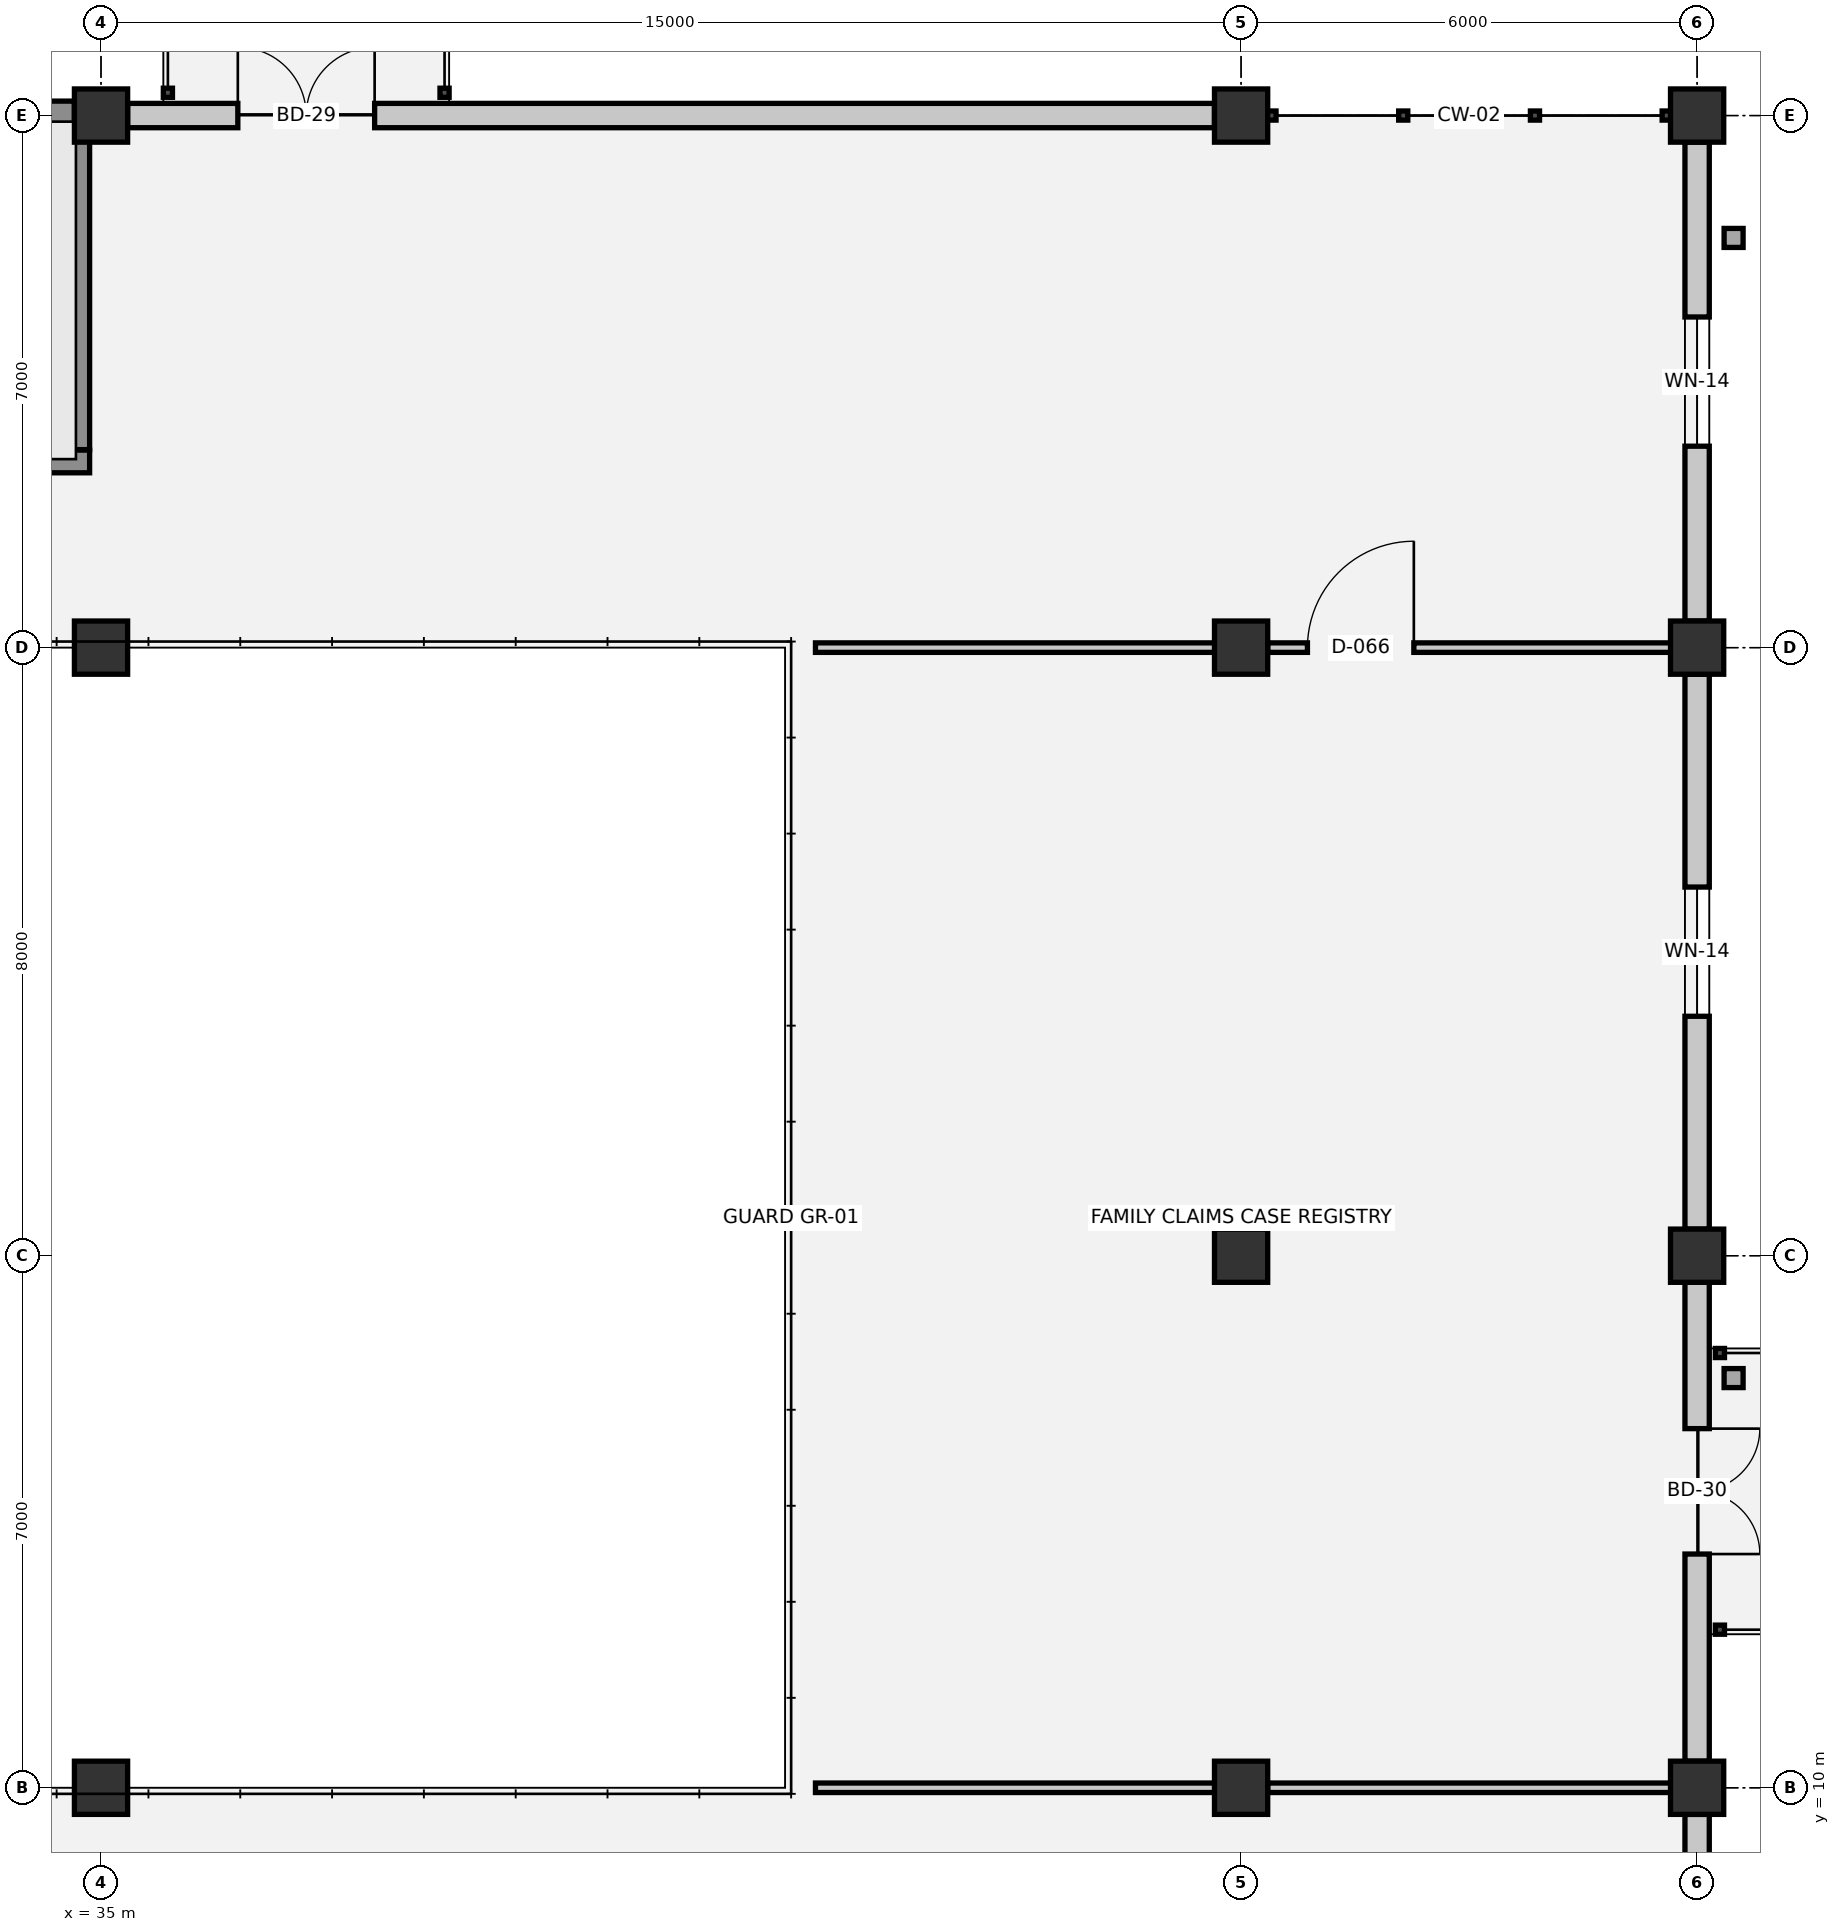
"""IFC4 building model, lengths in metres.
Left out: names, types, materials, properties, quantities, classifications, styles, units other than length and angle.
Written with IfcOpenShell. Run it as: python <this file> out.ifc"""

import sys

from ifc_helpers import new_model, si_unit, direction, frame, frame_2d, origin, origin_2d, place, context, subcontext, project, spatial, rectangle, extrude, element, fill, save


model = new_model("IFC4")
c1 = context("Model", 3, precision=1e-05, world=origin(), true_north=direction((0.0, 1.0)))
c2 = subcontext(c1, "Body", "Model", "MODEL_VIEW")
j1 = project(units=[si_unit("LENGTHUNIT", "METRE"), si_unit("PLANEANGLEUNIT", "RADIAN")], contexts=[c1])
p1 = place(None, origin())
s1 = spatial("IfcSite", under=j1, at=p1, CompositionType="ELEMENT")
p2 = place(p1, origin())
s2 = spatial("IfcBuilding", under=s1, at=p2, CompositionType="ELEMENT")
p3 = place(p2, frame((0.0, 0.0, 5.4)))
s3 = spatial("IfcBuildingStorey", under=s2, at=p3, CompositionType="ELEMENT", Elevation=5.4)
for number, where, z_axis, x_axis in (
    (1, (35.0, 10.0, 0.0), (0.0, 0.0, 1.0), (1.0, 0.0, 0.0)),
    (2, (35.0, 25.0, 0.0), (0.0, 0.0, 1.0), (1.0, 0.0, 0.0)),
    (3, (35.0, 32.0, 0.0), (0.0, 0.0, 1.0), (1.0, 0.0, 0.0)),
    (4, (50.0, 10.0, 0.0), (0.0, 0.0, 1.0), (1.0, 0.0, 0.0)),
    (5, (50.0, 17.0, 0.0), (0.0, 0.0, 1.0), (1.0, 0.0, 0.0)),
    (6, (50.0, 25.0, 0.0), (0.0, 0.0, 1.0), (1.0, 0.0, 0.0)),
    (7, (50.0, 32.0, 0.0), (0.0, 0.0, 1.0), (1.0, 0.0, 0.0)),
    (8, (56.0, 10.0, 0.0), (0.0, 0.0, 1.0), (1.0, 0.0, 0.0)),
    (9, (56.0, 17.0, 0.0), (0.0, 0.0, 1.0), (1.0, 0.0, 0.0)),
    (10, (56.0, 25.0, 0.0), (0.0, 0.0, 1.0), (1.0, 0.0, 0.0)),
    (11, (56.0, 32.0, 0.0), (0.0, 0.0, 1.0), (1.0, 0.0, 0.0)),
):
    element("IfcColumn", number, at=place(p3, frame(where, z_axis=z_axis, x_axis=x_axis)), inside=s3, PredefinedType="COLUMN", context=c2, shape_type="SweptSolid", body=[
        extrude(rectangle(XDim=0.7, YDim=0.7, at=origin_2d()), origin(), (0.0, 0.0, 1.0), 4.5),
    ])
p4 = place(p3, frame((20.35, 32.0, 0.0), z_axis=(0.0, 0.0, 1.0), x_axis=(1.0, 0.0, 0.0)))
e12 = element("IfcWall", 12, at=p4, inside=s3, PredefinedType="STANDARD", context=c2, shape_type="SweptSolid", body=[
    extrude(rectangle(XDim=14.3, YDim=0.38, at=frame_2d((7.15, 0.0))), origin(), (0.0, 0.0, 1.0), 3.26),
])
p5 = place(p4, frame((3.88, 0.0, 0.95)))
e13 = element("IfcOpeningElement", 13, at=p5, cuts=e12, PredefinedType="OPENING", context=c2, shape_type="SweptSolid", body=[
    extrude(rectangle(XDim=2.55, YDim=1.25, at=frame_2d((1.275, 0.625))), frame((0.0, 0.2, 0.0), z_axis=(0.0, -1.0, 0.0), x_axis=(1.0, 0.0, 0.0)), (0.0, 0.0, 1.0), 0.4),
])
p6 = place(p3, frame((35.35, 32.0, 0.0), z_axis=(0.0, 0.0, 1.0), x_axis=(1.0, 0.0, 0.0)))
e14 = element("IfcWall", 14, at=p6, inside=s3, PredefinedType="SOLIDWALL", context=c2, shape_type="SweptSolid", body=[
    extrude(rectangle(XDim=14.3, YDim=0.32, at=frame_2d((7.15, 0.0))), origin(), (0.0, 0.0, 1.0), 3.26),
])
p7 = place(p6, frame((1.45, 0.0, 0.0)))
e15 = element("IfcOpeningElement", 15, at=p7, cuts=e14, PredefinedType="OPENING", context=c2, shape_type="SweptSolid", body=[
    extrude(rectangle(XDim=1.8, YDim=2.25, at=frame_2d((0.9, 1.125))), frame((0.0, 0.17, 0.0), z_axis=(0.0, -1.0, 0.0), x_axis=(1.0, 0.0, 0.0)), (0.0, 0.0, 1.0), 0.34),
])
p8 = place(p3, frame((56.0, 31.65, 0.0), z_axis=(0.0, 0.0, 1.0), x_axis=(0.0, -1.0, 0.0)))
e16 = element("IfcWall", 16, at=p8, inside=s3, PredefinedType="SOLIDWALL", context=c2, shape_type="SweptSolid", body=[
    extrude(rectangle(XDim=6.3, YDim=0.32, at=frame_2d((3.15, 0.0))), origin(), (0.0, 0.0, 1.0), 3.26),
])
p9 = place(p8, frame((2.3, 0.0, 0.9)))
e17 = element("IfcOpeningElement", 17, at=p9, cuts=e16, PredefinedType="OPENING", context=c2, shape_type="SweptSolid", body=[
    extrude(rectangle(XDim=1.7, YDim=1.9, at=frame_2d((0.85, 0.95))), frame((0.0, 0.17, 0.0), z_axis=(0.0, -1.0, 0.0), x_axis=(1.0, 0.0, 0.0)), (0.0, 0.0, 1.0), 0.34),
])
p10 = place(p3, frame((56.0, 24.65, 0.0), z_axis=(0.0, 0.0, 1.0), x_axis=(0.0, -1.0, 0.0)))
e18 = element("IfcWall", 18, at=p10, inside=s3, PredefinedType="SOLIDWALL", context=c2, shape_type="SweptSolid", body=[
    extrude(rectangle(XDim=7.3, YDim=0.32, at=frame_2d((3.65, 0.0))), origin(), (0.0, 0.0, 1.0), 3.26),
])
p11 = place(p10, frame((2.8, 0.0, 0.9)))
e19 = element("IfcOpeningElement", 19, at=p11, cuts=e18, PredefinedType="OPENING", context=c2, shape_type="SweptSolid", body=[
    extrude(rectangle(XDim=1.7, YDim=1.9, at=frame_2d((0.85, 0.95))), frame((0.0, 0.17, 0.0), z_axis=(0.0, -1.0, 0.0), x_axis=(1.0, 0.0, 0.0)), (0.0, 0.0, 1.0), 0.34),
])
p12 = place(p3, frame((56.0, 16.65, 0.0), z_axis=(0.0, 0.0, 1.0), x_axis=(0.0, -1.0, 0.0)))
e20 = element("IfcWall", 20, at=p12, inside=s3, PredefinedType="SOLIDWALL", context=c2, shape_type="SweptSolid", body=[
    extrude(rectangle(XDim=6.3, YDim=0.32, at=frame_2d((3.15, 0.0))), origin(), (0.0, 0.0, 1.0), 3.26),
])
p13 = place(p12, frame((1.925, 0.0, 0.0)))
e21 = element("IfcOpeningElement", 21, at=p13, cuts=e20, PredefinedType="OPENING", context=c2, shape_type="SweptSolid", body=[
    extrude(rectangle(XDim=1.65, YDim=2.2, at=frame_2d((0.825, 1.1))), frame((0.0, 0.17, 0.0), z_axis=(0.0, -1.0, 0.0), x_axis=(1.0, 0.0, 0.0)), (0.0, 0.0, 1.0), 0.34),
])
p14 = place(p3, frame((56.0, 9.65, 0.0), z_axis=(0.0, 0.0, 1.0), x_axis=(0.0, -1.0, 0.0)))
e22 = element("IfcWall", 22, at=p14, inside=s3, PredefinedType="SOLIDWALL", context=c2, shape_type="SweptSolid", body=[
    extrude(rectangle(XDim=5.3, YDim=0.32, at=frame_2d((2.65, 0.0))), origin(), (0.0, 0.0, 1.0), 3.26),
])
p15 = place(p14, frame((2.07, 0.0, 0.9)))
e23 = element("IfcOpeningElement", 23, at=p15, cuts=e22, PredefinedType="OPENING", context=c2, shape_type="SweptSolid", body=[
    extrude(rectangle(XDim=1.7, YDim=1.9, at=frame_2d((0.85, 0.95))), frame((0.0, 0.17, 0.0), z_axis=(0.0, -1.0, 0.0), x_axis=(1.0, 0.0, 0.0)), (0.0, 0.0, 1.0), 0.34),
])
p16 = place(p3, frame((27.15, 27.45, 0.0), z_axis=(0.0, 0.0, 1.0), x_axis=(1.0, 0.0, 0.0)))
e24 = element("IfcWall", 24, at=p16, inside=s3, PredefinedType="SHEAR", context=c2, shape_type="SweptSolid", body=[
    extrude(rectangle(XDim=7.7, YDim=0.3, at=frame_2d((3.85, 0.0))), origin(), (0.0, 0.0, 1.0), 4.24),
])
p17 = place(p16, frame((0.425, 0.0, 0.0)))
e25 = element("IfcOpeningElement", 25, at=p17, cuts=e24, PredefinedType="OPENING", context=c2, shape_type="SweptSolid", body=[
    extrude(rectangle(XDim=1.25, YDim=2.15, at=frame_2d((0.625, 1.075))), frame((0.0, 0.16, 0.0), z_axis=(0.0, -1.0, 0.0), x_axis=(1.0, 0.0, 0.0)), (0.0, 0.0, 1.0), 0.32),
])
p18 = place(p3, frame((34.7, 27.605, 0.0), z_axis=(0.0, 0.0, 1.0), x_axis=(0.0, 1.0, 0.0)))
e26 = element("IfcWall", 26, at=p18, inside=s3, PredefinedType="SHEAR", context=c2, shape_type="SweptSolid", body=[
    extrude(rectangle(XDim=4.2, YDim=0.3, at=frame_2d((2.1, 0.0))), origin(), (0.0, 0.0, 1.0), 4.24),
])
p19 = place(p3, frame((44.4, 10.0, 0.0), z_axis=(0.0, 0.0, 1.0), x_axis=(1.0, 0.0, 0.0)))
e27 = element("IfcWall", 27, at=p19, inside=s3, PredefinedType="PARTITIONING", context=c2, shape_type="SweptSolid", body=[
    extrude(rectangle(XDim=5.95, YDim=0.125, at=frame_2d((2.975, 0.0))), origin(), (0.0, 0.0, 1.0), 3.28),
])
p20 = place(p3, frame((50.35, 10.0, 0.0), z_axis=(0.0, 0.0, 1.0), x_axis=(1.0, 0.0, 0.0)))
e28 = element("IfcWall", 28, at=p20, inside=s3, PredefinedType="PARTITIONING", context=c2, shape_type="SweptSolid", body=[
    extrude(rectangle(XDim=5.57, YDim=0.125, at=frame_2d((2.785, 0.0))), origin(), (0.0, 0.0, 1.0), 3.53),
])
p21 = place(p3, frame((44.4, 25.0, 0.0), z_axis=(0.0, 0.0, 1.0), x_axis=(1.0, 0.0, 0.0)))
e29 = element("IfcWall", 29, at=p21, inside=s3, PredefinedType="PARTITIONING", context=c2, shape_type="SweptSolid", body=[
    extrude(rectangle(XDim=5.95, YDim=0.125, at=frame_2d((2.975, 0.0))), origin(), (0.0, 0.0, 1.0), 3.28),
])
p22 = place(p3, frame((50.35, 25.0, 0.0), z_axis=(0.0, 0.0, 1.0), x_axis=(1.0, 0.0, 0.0)))
e30 = element("IfcWall", 30, at=p22, inside=s3, PredefinedType="PARTITIONING", context=c2, shape_type="SweptSolid", body=[
    extrude(rectangle(XDim=5.57, YDim=0.125, at=frame_2d((2.785, 0.0))), origin(), (0.0, 0.0, 1.0), 3.53),
])
p23 = place(p22, frame((0.523, 0.0, 0.0)))
e31 = element("IfcOpeningElement", 31, at=p23, cuts=e30, PredefinedType="OPENING", context=c2, shape_type="SweptSolid", body=[
    extrude(rectangle(XDim=1.4, YDim=2.2, at=frame_2d((0.7, 1.1))), frame((0.0, 0.073, 0.0), z_axis=(0.0, -1.0, 0.0), x_axis=(1.0, 0.0, 0.0)), (0.0, 0.0, 1.0), 0.145),
])
p24 = place(p7, origin())
e32 = element("IfcDoor", 32, at=p24, inside=s3, OperationType="DOUBLE_DOOR_SINGLE_SWING", PredefinedType="DOOR", context=c2, shape_type="SweptSolid", body=[
    extrude(rectangle(XDim=1.8, YDim=2.25, at=frame_2d((0.9, 1.125))), frame((0.0, 0.025, 0.0), z_axis=(0.0, -1.0, 0.0), x_axis=(1.0, 0.0, 0.0)), (0.0, 0.0, 1.0), 0.05),
])
fill(e15, e32)
p25 = place(p9, origin())
e33 = element("IfcWindow", 33, at=p25, inside=s3, PartitioningType="SINGLE_PANEL", PredefinedType="WINDOW", context=c2, shape_type="SweptSolid", body=[
    extrude(rectangle(XDim=1.7, YDim=1.9, at=frame_2d((0.85, 0.95))), frame((0.0, 0.03, 0.0), z_axis=(0.0, -1.0, 0.0), x_axis=(1.0, 0.0, 0.0)), (0.0, 0.0, 1.0), 0.06),
])
fill(e17, e33)
p26 = place(p11, origin())
e34 = element("IfcWindow", 34, at=p26, inside=s3, PartitioningType="SINGLE_PANEL", PredefinedType="WINDOW", context=c2, shape_type="SweptSolid", body=[
    extrude(rectangle(XDim=1.7, YDim=1.9, at=frame_2d((0.85, 0.95))), frame((0.0, 0.03, 0.0), z_axis=(0.0, -1.0, 0.0), x_axis=(1.0, 0.0, 0.0)), (0.0, 0.0, 1.0), 0.06),
])
fill(e19, e34)
p27 = place(p13, origin())
e35 = element("IfcDoor", 35, at=p27, inside=s3, OperationType="DOUBLE_DOOR_SINGLE_SWING", PredefinedType="DOOR", context=c2, shape_type="SweptSolid", body=[
    extrude(rectangle(XDim=1.65, YDim=2.2, at=frame_2d((0.825, 1.1))), frame((0.0, 0.025, 0.0), z_axis=(0.0, -1.0, 0.0), x_axis=(1.0, 0.0, 0.0)), (0.0, 0.0, 1.0), 0.05),
])
fill(e21, e35)
p28 = place(p23, origin())
e36 = element("IfcDoor", 36, at=p28, inside=s3, OperationType="SINGLE_SWING_RIGHT", PredefinedType="DOOR", context=c2, shape_type="SweptSolid", body=[
    extrude(rectangle(XDim=1.4, YDim=2.2, at=frame_2d((0.7, 1.1))), frame((0.0, 0.025, 0.0), z_axis=(0.0, -1.0, 0.0), x_axis=(1.0, 0.0, 0.0)), (0.0, 0.0, 1.0), 0.05),
])
fill(e31, e36)
save(model, sys.argv[1])
